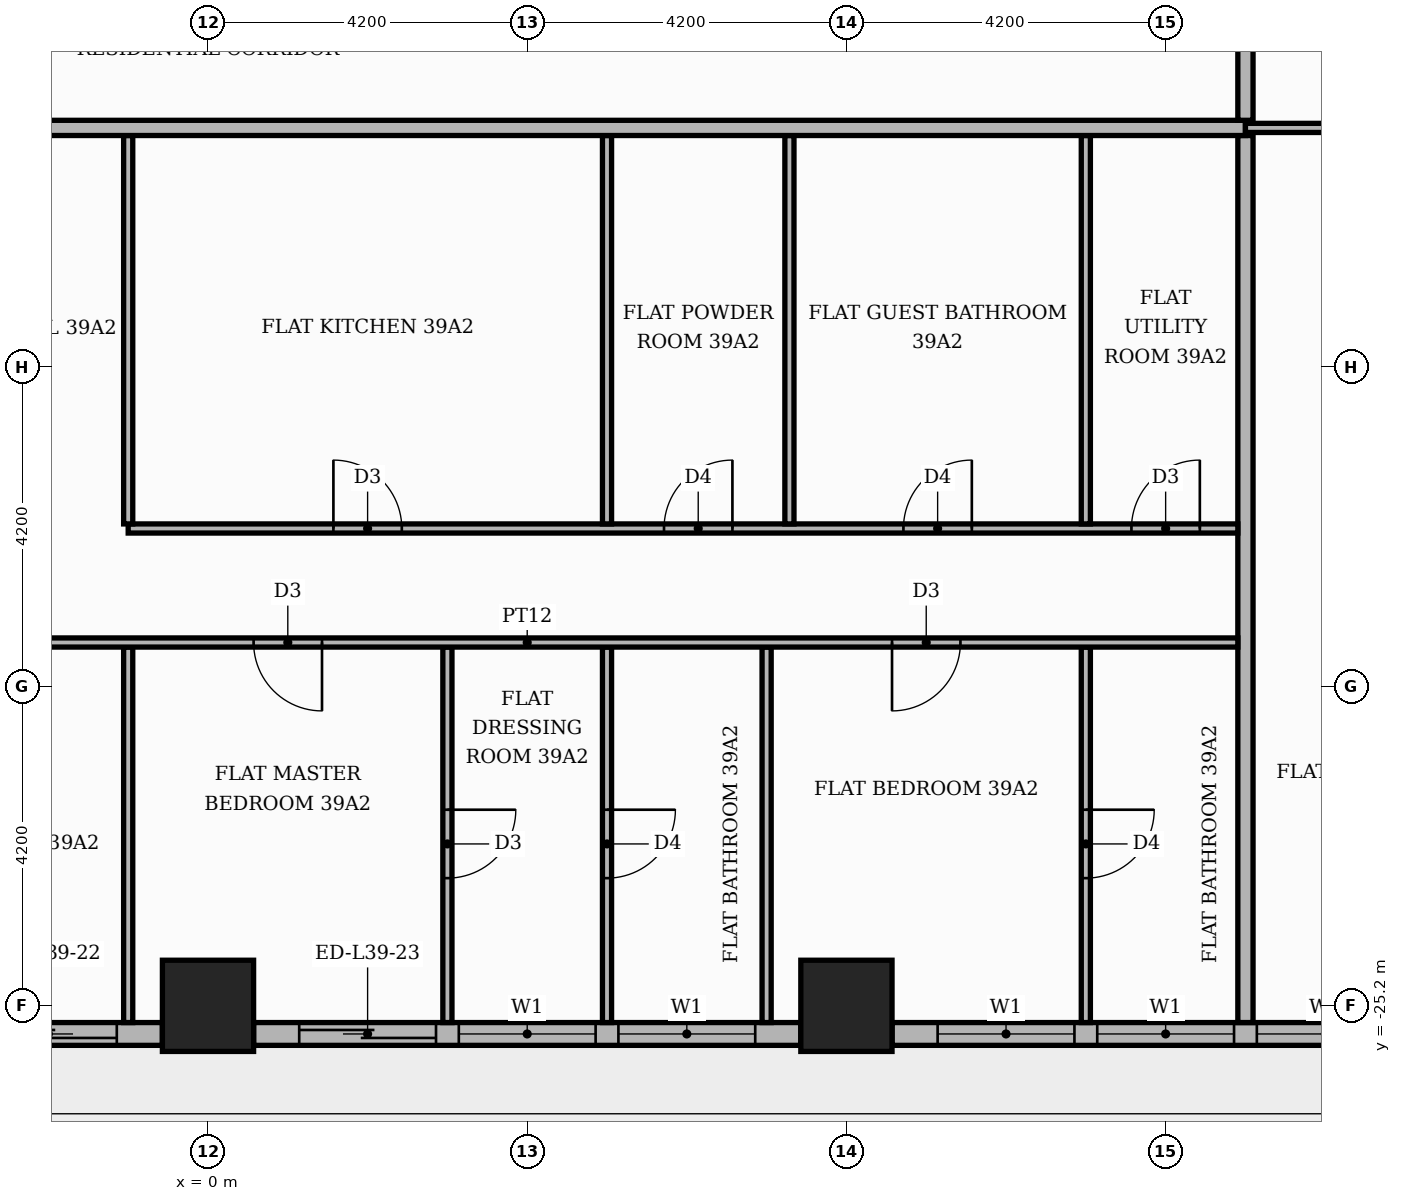
"""IFC4 building model, lengths in metres.
Left out: names, types, materials, properties, quantities, classifications, styles, units other than length and angle.
Written with IfcOpenShell. Run it as: python <this file> out.ifc"""

import sys

from ifc_helpers import new_model, si_unit, direction, frame, frame_2d, origin, origin_2d, place, context, subcontext, project, spatial, rectangle, extrude, element, fill, save


model = new_model("IFC4")
c1 = context("Model", 3, precision=1e-05, world=origin(), true_north=direction((0.0, 1.0)))
c2 = subcontext(c1, "Body", "Model", "MODEL_VIEW")
j1 = project(units=[si_unit("LENGTHUNIT", "METRE"), si_unit("PLANEANGLEUNIT", "RADIAN")], contexts=[c1])
p1 = place(None, origin())
s1 = spatial("IfcSite", under=j1, at=p1, CompositionType="ELEMENT")
p2 = place(p1, origin())
s2 = spatial("IfcBuilding", under=s1, at=p2, CompositionType="ELEMENT")
p3 = place(p2, frame((0.0, 0.0, 165.0)))
s3 = spatial("IfcBuildingStorey", under=s2, at=p3, CompositionType="ELEMENT", Elevation=165.0)
for number, where, z_axis, x_axis in (
    (1, (0.0, -25.2, 0.0), (0.0, 0.0, 1.0), (1.0, 0.0, 0.0)),
    (2, (8.4, -25.2, 0.0), (0.0, 0.0, 1.0), (1.0, 0.0, 0.0)),
):
    element("IfcColumn", number, at=place(p3, frame(where, z_axis=z_axis, x_axis=x_axis)), inside=s3, PredefinedType="COLUMN", context=c2, shape_type="SweptSolid", body=[
        extrude(rectangle(XDim=1.2, YDim=1.2, at=origin_2d()), origin(), (0.0, 0.0, 1.0), 3.9),
    ])
p4 = place(p3, frame((-7.8, -25.57, 0.0), z_axis=(0.0, 0.0, 1.0), x_axis=(1.0, 0.0, 0.0)))
e3 = element("IfcWall", 3, at=p4, inside=s3, PredefinedType="STANDARD", context=c2, shape_type="SweptSolid", body=[
    extrude(rectangle(XDim=7.2, YDim=0.3, at=frame_2d((3.6, 0.0))), origin(), (0.0, 0.0, 1.0), 3.48),
])
p5 = place(p4, frame((0.6, 0.0, 0.9)))
e4 = element("IfcOpeningElement", 4, at=p5, cuts=e3, PredefinedType="OPENING", context=c2, shape_type="SweptSolid", body=[
    extrude(rectangle(XDim=1.8, YDim=2.1, at=frame_2d((0.9, 1.05))), frame((0.0, 0.16, 0.0), z_axis=(0.0, -1.0, 0.0), x_axis=(1.0, 0.0, 0.0)), (0.0, 0.0, 1.0), 0.32),
])
p6 = place(p4, frame((2.7, 0.0, 0.9)))
e5 = element("IfcOpeningElement", 5, at=p6, cuts=e3, PredefinedType="OPENING", context=c2, shape_type="SweptSolid", body=[
    extrude(rectangle(XDim=1.8, YDim=2.1, at=frame_2d((0.9, 1.05))), frame((0.0, 0.16, 0.0), z_axis=(0.0, -1.0, 0.0), x_axis=(1.0, 0.0, 0.0)), (0.0, 0.0, 1.0), 0.32),
])
p7 = place(p4, frame((4.8, 0.0, 0.0)))
e6 = element("IfcOpeningElement", 6, at=p7, cuts=e3, PredefinedType="OPENING", context=c2, shape_type="SweptSolid", body=[
    extrude(rectangle(XDim=1.8, YDim=2.4, at=frame_2d((0.9, 1.2))), frame((0.0, 0.16, 0.0), z_axis=(0.0, -1.0, 0.0), x_axis=(1.0, 0.0, 0.0)), (0.0, 0.0, 1.0), 0.32),
])
p8 = place(p3, frame((0.6, -25.57, 0.0), z_axis=(0.0, 0.0, 1.0), x_axis=(1.0, 0.0, 0.0)))
e7 = element("IfcWall", 7, at=p8, inside=s3, PredefinedType="STANDARD", context=c2, shape_type="SweptSolid", body=[
    extrude(rectangle(XDim=7.2, YDim=0.3, at=frame_2d((3.6, 0.0))), origin(), (0.0, 0.0, 1.0), 3.48),
])
p9 = place(p8, frame((0.6, 0.0, 0.0)))
e8 = element("IfcOpeningElement", 8, at=p9, cuts=e7, PredefinedType="OPENING", context=c2, shape_type="SweptSolid", body=[
    extrude(rectangle(XDim=1.8, YDim=2.4, at=frame_2d((0.9, 1.2))), frame((0.0, 0.16, 0.0), z_axis=(0.0, -1.0, 0.0), x_axis=(1.0, 0.0, 0.0)), (0.0, 0.0, 1.0), 0.32),
])
p10 = place(p8, frame((2.7, 0.0, 0.9)))
e9 = element("IfcOpeningElement", 9, at=p10, cuts=e7, PredefinedType="OPENING", context=c2, shape_type="SweptSolid", body=[
    extrude(rectangle(XDim=1.8, YDim=2.1, at=frame_2d((0.9, 1.05))), frame((0.0, 0.16, 0.0), z_axis=(0.0, -1.0, 0.0), x_axis=(1.0, 0.0, 0.0)), (0.0, 0.0, 1.0), 0.32),
])
p11 = place(p8, frame((4.8, 0.0, 0.9)))
e10 = element("IfcOpeningElement", 10, at=p11, cuts=e7, PredefinedType="OPENING", context=c2, shape_type="SweptSolid", body=[
    extrude(rectangle(XDim=1.8, YDim=2.1, at=frame_2d((0.9, 1.05))), frame((0.0, 0.16, 0.0), z_axis=(0.0, -1.0, 0.0), x_axis=(1.0, 0.0, 0.0)), (0.0, 0.0, 1.0), 0.32),
])
p12 = place(p3, frame((9.0, -25.57, 0.0), z_axis=(0.0, 0.0, 1.0), x_axis=(1.0, 0.0, 0.0)))
e11 = element("IfcWall", 11, at=p12, inside=s3, PredefinedType="STANDARD", context=c2, shape_type="SweptSolid", body=[
    extrude(rectangle(XDim=7.2, YDim=0.3, at=frame_2d((3.6, 0.0))), origin(), (0.0, 0.0, 1.0), 3.48),
])
p13 = place(p12, frame((0.6, 0.0, 0.9)))
e12 = element("IfcOpeningElement", 12, at=p13, cuts=e11, PredefinedType="OPENING", context=c2, shape_type="SweptSolid", body=[
    extrude(rectangle(XDim=1.8, YDim=2.1, at=frame_2d((0.9, 1.05))), frame((0.0, 0.16, 0.0), z_axis=(0.0, -1.0, 0.0), x_axis=(1.0, 0.0, 0.0)), (0.0, 0.0, 1.0), 0.32),
])
p14 = place(p12, frame((2.7, 0.0, 0.9)))
e13 = element("IfcOpeningElement", 13, at=p14, cuts=e11, PredefinedType="OPENING", context=c2, shape_type="SweptSolid", body=[
    extrude(rectangle(XDim=1.8, YDim=2.1, at=frame_2d((0.9, 1.05))), frame((0.0, 0.16, 0.0), z_axis=(0.0, -1.0, 0.0), x_axis=(1.0, 0.0, 0.0)), (0.0, 0.0, 1.0), 0.32),
])
p15 = place(p12, frame((4.8, 0.0, 0.9)))
e14 = element("IfcOpeningElement", 14, at=p15, cuts=e11, PredefinedType="OPENING", context=c2, shape_type="SweptSolid", body=[
    extrude(rectangle(XDim=1.8, YDim=2.1, at=frame_2d((0.9, 1.05))), frame((0.0, 0.16, 0.0), z_axis=(0.0, -1.0, 0.0), x_axis=(1.0, 0.0, 0.0)), (0.0, 0.0, 1.0), 0.32),
])
p16 = place(p3, frame((-1.05, -25.42, 0.0), z_axis=(0.0, 0.0, 1.0), x_axis=(0.0, 1.0, 0.0)))
e15 = element("IfcWall", 15, at=p16, inside=s3, PredefinedType="PARTITIONING", context=c2, shape_type="SweptSolid", body=[
    extrude(rectangle(XDim=4.94, YDim=0.12, at=frame_2d((2.47, 0.0))), origin(), (0.0, 0.0, 1.0), 3.48),
])
p17 = place(p3, frame((3.15, -25.42, 0.0), z_axis=(0.0, 0.0, 1.0), x_axis=(0.0, 1.0, 0.0)))
e16 = element("IfcWall", 16, at=p17, inside=s3, PredefinedType="PARTITIONING", context=c2, shape_type="SweptSolid", body=[
    extrude(rectangle(XDim=4.94, YDim=0.12, at=frame_2d((2.47, 0.0))), origin(), (0.0, 0.0, 1.0), 3.48),
])
p18 = place(p17, frame((1.9, 0.0, 0.0)))
e17 = element("IfcOpeningElement", 17, at=p18, cuts=e16, PredefinedType="OPENING", context=c2, shape_type="SweptSolid", body=[
    extrude(rectangle(XDim=0.9, YDim=2.1, at=frame_2d((0.45, 1.05))), frame((0.0, 0.07, 0.0), z_axis=(0.0, -1.0, 0.0), x_axis=(1.0, 0.0, 0.0)), (0.0, 0.0, 1.0), 0.14),
])
p19 = place(p3, frame((5.25, -25.42, 0.0), z_axis=(0.0, 0.0, 1.0), x_axis=(0.0, 1.0, 0.0)))
e18 = element("IfcWall", 18, at=p19, inside=s3, PredefinedType="PARTITIONING", context=c2, shape_type="SweptSolid", body=[
    extrude(rectangle(XDim=4.94, YDim=0.12, at=frame_2d((2.47, 0.0))), origin(), (0.0, 0.0, 1.0), 3.48),
])
p20 = place(p19, frame((1.9, 0.0, 0.0)))
e19 = element("IfcOpeningElement", 19, at=p20, cuts=e18, PredefinedType="OPENING", context=c2, shape_type="SweptSolid", body=[
    extrude(rectangle(XDim=0.9, YDim=2.1, at=frame_2d((0.45, 1.05))), frame((0.0, 0.07, 0.0), z_axis=(0.0, -1.0, 0.0), x_axis=(1.0, 0.0, 0.0)), (0.0, 0.0, 1.0), 0.14),
])
p21 = place(p3, frame((7.35, -25.42, 0.0), z_axis=(0.0, 0.0, 1.0), x_axis=(0.0, 1.0, 0.0)))
e20 = element("IfcWall", 20, at=p21, inside=s3, PredefinedType="PARTITIONING", context=c2, shape_type="SweptSolid", body=[
    extrude(rectangle(XDim=4.94, YDim=0.12, at=frame_2d((2.47, 0.0))), origin(), (0.0, 0.0, 1.0), 3.48),
])
p22 = place(p3, frame((11.55, -25.42, 0.0), z_axis=(0.0, 0.0, 1.0), x_axis=(0.0, 1.0, 0.0)))
e21 = element("IfcWall", 21, at=p22, inside=s3, PredefinedType="PARTITIONING", context=c2, shape_type="SweptSolid", body=[
    extrude(rectangle(XDim=4.94, YDim=0.12, at=frame_2d((2.47, 0.0))), origin(), (0.0, 0.0, 1.0), 3.48),
])
p23 = place(p22, frame((1.9, 0.0, 0.0)))
e22 = element("IfcOpeningElement", 22, at=p23, cuts=e21, PredefinedType="OPENING", context=c2, shape_type="SweptSolid", body=[
    extrude(rectangle(XDim=0.9, YDim=2.1, at=frame_2d((0.45, 1.05))), frame((0.0, 0.07, 0.0), z_axis=(0.0, -1.0, 0.0), x_axis=(1.0, 0.0, 0.0)), (0.0, 0.0, 1.0), 0.14),
])
p24 = place(p3, frame((13.65, -25.42, 0.0), z_axis=(0.0, 0.0, 1.0), x_axis=(0.0, 1.0, 0.0)))
e23 = element("IfcWall", 23, at=p24, inside=s3, PredefinedType="PARTITIONING", context=c2, shape_type="SweptSolid", body=[
    extrude(rectangle(XDim=11.67, YDim=0.2, at=frame_2d((5.835, 0.0))), origin(), (0.0, 0.0, 1.0), 3.48),
])
p25 = place(p3, frame((-5.15, -20.42, 0.0), z_axis=(0.0, 0.0, 1.0), x_axis=(1.0, 0.0, 0.0)))
e24 = element("IfcWall", 24, at=p25, inside=s3, PredefinedType="PARTITIONING", context=c2, shape_type="SweptSolid", body=[
    extrude(rectangle(XDim=18.7, YDim=0.12, at=frame_2d((9.35, 0.0))), origin(), (0.0, 0.0, 1.0), 3.48),
])
p26 = place(p25, frame((1.5, 0.0, 0.0)))
e25 = element("IfcOpeningElement", 25, at=p26, cuts=e24, PredefinedType="OPENING", context=c2, shape_type="SweptSolid", body=[
    extrude(rectangle(XDim=1.0, YDim=2.1, at=frame_2d((0.5, 1.05))), frame((0.0, 0.07, 0.0), z_axis=(0.0, -1.0, 0.0), x_axis=(1.0, 0.0, 0.0)), (0.0, 0.0, 1.0), 0.14),
])
p27 = place(p25, frame((5.75, 0.0, 0.0)))
e26 = element("IfcOpeningElement", 26, at=p27, cuts=e24, PredefinedType="OPENING", context=c2, shape_type="SweptSolid", body=[
    extrude(rectangle(XDim=0.9, YDim=2.1, at=frame_2d((0.45, 1.05))), frame((0.0, 0.07, 0.0), z_axis=(0.0, -1.0, 0.0), x_axis=(1.0, 0.0, 0.0)), (0.0, 0.0, 1.0), 0.14),
])
p28 = place(p25, frame((14.15, 0.0, 0.0)))
e27 = element("IfcOpeningElement", 27, at=p28, cuts=e24, PredefinedType="OPENING", context=c2, shape_type="SweptSolid", body=[
    extrude(rectangle(XDim=0.9, YDim=2.1, at=frame_2d((0.45, 1.05))), frame((0.0, 0.07, 0.0), z_axis=(0.0, -1.0, 0.0), x_axis=(1.0, 0.0, 0.0)), (0.0, 0.0, 1.0), 0.14),
])
p29 = place(p3, frame((-1.05, -18.92, 0.0), z_axis=(0.0, 0.0, 1.0), x_axis=(1.0, 0.0, 0.0)))
e28 = element("IfcWall", 28, at=p29, inside=s3, PredefinedType="PARTITIONING", context=c2, shape_type="SweptSolid", body=[
    extrude(rectangle(XDim=14.6, YDim=0.12, at=frame_2d((7.3, 0.0))), origin(), (0.0, 0.0, 1.0), 3.48),
])
p30 = place(p29, frame((2.7, 0.0, 0.0)))
e29 = element("IfcOpeningElement", 29, at=p30, cuts=e28, PredefinedType="OPENING", context=c2, shape_type="SweptSolid", body=[
    extrude(rectangle(XDim=0.9, YDim=2.1, at=frame_2d((0.45, 1.05))), frame((0.0, 0.07, 0.0), z_axis=(0.0, -1.0, 0.0), x_axis=(1.0, 0.0, 0.0)), (0.0, 0.0, 1.0), 0.14),
])
p31 = place(p29, frame((7.05, 0.0, 0.0)))
e30 = element("IfcOpeningElement", 30, at=p31, cuts=e28, PredefinedType="OPENING", context=c2, shape_type="SweptSolid", body=[
    extrude(rectangle(XDim=0.9, YDim=2.1, at=frame_2d((0.45, 1.05))), frame((0.0, 0.07, 0.0), z_axis=(0.0, -1.0, 0.0), x_axis=(1.0, 0.0, 0.0)), (0.0, 0.0, 1.0), 0.14),
])
p32 = place(p29, frame((10.2, 0.0, 0.0)))
e31 = element("IfcOpeningElement", 31, at=p32, cuts=e28, PredefinedType="OPENING", context=c2, shape_type="SweptSolid", body=[
    extrude(rectangle(XDim=0.9, YDim=2.1, at=frame_2d((0.45, 1.05))), frame((0.0, 0.07, 0.0), z_axis=(0.0, -1.0, 0.0), x_axis=(1.0, 0.0, 0.0)), (0.0, 0.0, 1.0), 0.14),
])
p33 = place(p29, frame((13.2, 0.0, 0.0)))
e32 = element("IfcOpeningElement", 32, at=p33, cuts=e28, PredefinedType="OPENING", context=c2, shape_type="SweptSolid", body=[
    extrude(rectangle(XDim=0.9, YDim=2.1, at=frame_2d((0.45, 1.05))), frame((0.0, 0.07, 0.0), z_axis=(0.0, -1.0, 0.0), x_axis=(1.0, 0.0, 0.0)), (0.0, 0.0, 1.0), 0.14),
])
for number, where, z_axis, x_axis in (
    (33, (-1.05, -18.86, 0.0), (0.0, 0.0, 1.0), (0.0, 1.0, 0.0)),
    (34, (5.25, -18.86, 0.0), (0.0, 0.0, 1.0), (0.0, 1.0, 0.0)),
    (35, (7.65, -18.86, 0.0), (0.0, 0.0, 1.0), (0.0, 1.0, 0.0)),
    (36, (11.55, -18.86, 0.0), (0.0, 0.0, 1.0), (0.0, 1.0, 0.0)),
):
    element("IfcWall", number, at=place(p3, frame(where, z_axis=z_axis, x_axis=x_axis)), inside=s3, PredefinedType="PARTITIONING", context=c2, shape_type="SweptSolid", body=[
        extrude(rectangle(XDim=5.11, YDim=0.12, at=frame_2d((2.555, 0.0))), origin(), (0.0, 0.0, 1.0), 3.48),
    ])
p34 = place(p3, frame((-25.42, -13.65, 0.0), z_axis=(0.0, 0.0, 1.0), x_axis=(1.0, 0.0, 0.0)))
e37 = element("IfcWall", 37, at=p34, inside=s3, PredefinedType="PARTITIONING", context=c2, shape_type="SweptSolid", body=[
    extrude(rectangle(XDim=39.07, YDim=0.2, at=frame_2d((19.535, 0.0))), origin(), (0.0, 0.0, 1.0), 3.48),
])
p35 = place(p34, frame((13.32, 0.0, 0.0)))
e38 = element("IfcOpeningElement", 38, at=p35, cuts=e37, PredefinedType="OPENING", context=c2, shape_type="SweptSolid", body=[
    extrude(rectangle(XDim=1.1, YDim=2.4, at=frame_2d((0.55, 1.2))), frame((0.0, 0.11, 0.0), z_axis=(0.0, -1.0, 0.0), x_axis=(1.0, 0.0, 0.0)), (0.0, 0.0, 1.0), 0.22),
])
p36 = place(p34, frame((21.72, 0.0, 0.0)))
e39 = element("IfcOpeningElement", 39, at=p36, cuts=e37, PredefinedType="OPENING", context=c2, shape_type="SweptSolid", body=[
    extrude(rectangle(XDim=1.1, YDim=2.4, at=frame_2d((0.55, 1.2))), frame((0.0, 0.11, 0.0), z_axis=(0.0, -1.0, 0.0), x_axis=(1.0, 0.0, 0.0)), (0.0, 0.0, 1.0), 0.22),
])
p37 = place(p3, frame((13.65, -13.65, 0.0), z_axis=(0.0, 0.0, 1.0), x_axis=(1.0, 0.0, 0.0)))
e40 = element("IfcWall", 40, at=p37, inside=s3, PredefinedType="PARTITIONING", context=c2, shape_type="SweptSolid", body=[
    extrude(rectangle(XDim=7.07, YDim=0.12, at=frame_2d((3.535, 0.0))), origin(), (0.0, 0.0, 1.0), 3.48),
])
p38 = place(p37, frame((3.085, 0.0, 0.0)))
e41 = element("IfcOpeningElement", 41, at=p38, cuts=e40, PredefinedType="OPENING", context=c2, shape_type="SweptSolid", body=[
    extrude(rectangle(XDim=0.9, YDim=2.1, at=frame_2d((0.45, 1.05))), frame((0.0, 0.07, 0.0), z_axis=(0.0, -1.0, 0.0), x_axis=(1.0, 0.0, 0.0)), (0.0, 0.0, 1.0), 0.14),
])
p39 = place(p3, frame((13.65, -13.55, 0.0), z_axis=(0.0, 0.0, 1.0), x_axis=(0.0, 1.0, 0.0)))
e42 = element("IfcWall", 42, at=p39, inside=s3, PredefinedType="PARTITIONING", context=c2, shape_type="SweptSolid", body=[
    extrude(rectangle(XDim=2.45, YDim=0.2, at=frame_2d((1.225, 0.0))), origin(), (0.0, 0.0, 1.0), 3.48),
])
p40 = place(p7, origin())
e43 = element("IfcDoor", 43, at=p40, inside=s3, OperationType="SLIDING_TO_RIGHT", PredefinedType="DOOR", context=c2, shape_type="SweptSolid", body=[
    extrude(rectangle(XDim=1.8, YDim=2.4, at=frame_2d((0.9, 1.2))), frame((0.0, 0.025, 0.0), z_axis=(0.0, -1.0, 0.0), x_axis=(1.0, 0.0, 0.0)), (0.0, 0.0, 1.0), 0.05),
])
fill(e6, e43)
p41 = place(p9, origin())
e44 = element("IfcDoor", 44, at=p41, inside=s3, OperationType="SLIDING_TO_LEFT", PredefinedType="DOOR", context=c2, shape_type="SweptSolid", body=[
    extrude(rectangle(XDim=1.8, YDim=2.4, at=frame_2d((0.9, 1.2))), frame((0.0, 0.025, 0.0), z_axis=(0.0, -1.0, 0.0), x_axis=(1.0, 0.0, 0.0)), (0.0, 0.0, 1.0), 0.05),
])
fill(e8, e44)
p42 = place(p10, origin())
e45 = element("IfcWindow", 45, at=p42, inside=s3, PartitioningType="SINGLE_PANEL", PredefinedType="WINDOW", context=c2, shape_type="SweptSolid", body=[
    extrude(rectangle(XDim=1.8, YDim=2.1, at=frame_2d((0.9, 1.05))), frame((0.0, 0.03, 0.0), z_axis=(0.0, -1.0, 0.0), x_axis=(1.0, 0.0, 0.0)), (0.0, 0.0, 1.0), 0.06),
])
fill(e9, e45)
p43 = place(p11, origin())
e46 = element("IfcWindow", 46, at=p43, inside=s3, PartitioningType="SINGLE_PANEL", PredefinedType="WINDOW", context=c2, shape_type="SweptSolid", body=[
    extrude(rectangle(XDim=1.8, YDim=2.1, at=frame_2d((0.9, 1.05))), frame((0.0, 0.03, 0.0), z_axis=(0.0, -1.0, 0.0), x_axis=(1.0, 0.0, 0.0)), (0.0, 0.0, 1.0), 0.06),
])
fill(e10, e46)
p44 = place(p13, origin())
e47 = element("IfcWindow", 47, at=p44, inside=s3, PartitioningType="SINGLE_PANEL", PredefinedType="WINDOW", context=c2, shape_type="SweptSolid", body=[
    extrude(rectangle(XDim=1.8, YDim=2.1, at=frame_2d((0.9, 1.05))), frame((0.0, 0.03, 0.0), z_axis=(0.0, -1.0, 0.0), x_axis=(1.0, 0.0, 0.0)), (0.0, 0.0, 1.0), 0.06),
])
fill(e12, e47)
p45 = place(p14, origin())
e48 = element("IfcWindow", 48, at=p45, inside=s3, PartitioningType="SINGLE_PANEL", PredefinedType="WINDOW", context=c2, shape_type="SweptSolid", body=[
    extrude(rectangle(XDim=1.8, YDim=2.1, at=frame_2d((0.9, 1.05))), frame((0.0, 0.03, 0.0), z_axis=(0.0, -1.0, 0.0), x_axis=(1.0, 0.0, 0.0)), (0.0, 0.0, 1.0), 0.06),
])
fill(e13, e48)
p46 = place(p15, origin())
e49 = element("IfcWindow", 49, at=p46, inside=s3, PartitioningType="SINGLE_PANEL", PredefinedType="WINDOW", context=c2, shape_type="SweptSolid", body=[
    extrude(rectangle(XDim=1.8, YDim=2.1, at=frame_2d((0.9, 1.05))), frame((0.0, 0.03, 0.0), z_axis=(0.0, -1.0, 0.0), x_axis=(1.0, 0.0, 0.0)), (0.0, 0.0, 1.0), 0.06),
])
fill(e14, e49)
p47 = place(p30, origin())
e50 = element("IfcDoor", 50, at=p47, inside=s3, OperationType="SINGLE_SWING_LEFT", PredefinedType="DOOR", context=c2, shape_type="SweptSolid", body=[
    extrude(rectangle(XDim=0.9, YDim=2.1, at=frame_2d((0.45, 1.05))), frame((0.0, 0.025, 0.0), z_axis=(0.0, -1.0, 0.0), x_axis=(1.0, 0.0, 0.0)), (0.0, 0.0, 1.0), 0.05),
])
fill(e29, e50)
p48 = place(p31, origin())
e51 = element("IfcDoor", 51, at=p48, inside=s3, OperationType="SINGLE_SWING_RIGHT", PredefinedType="DOOR", context=c2, shape_type="SweptSolid", body=[
    extrude(rectangle(XDim=0.9, YDim=2.1, at=frame_2d((0.45, 1.05))), frame((0.0, 0.025, 0.0), z_axis=(0.0, -1.0, 0.0), x_axis=(1.0, 0.0, 0.0)), (0.0, 0.0, 1.0), 0.05),
])
fill(e30, e51)
p49 = place(p32, origin())
e52 = element("IfcDoor", 52, at=p49, inside=s3, OperationType="SINGLE_SWING_RIGHT", PredefinedType="DOOR", context=c2, shape_type="SweptSolid", body=[
    extrude(rectangle(XDim=0.9, YDim=2.1, at=frame_2d((0.45, 1.05))), frame((0.0, 0.025, 0.0), z_axis=(0.0, -1.0, 0.0), x_axis=(1.0, 0.0, 0.0)), (0.0, 0.0, 1.0), 0.05),
])
fill(e31, e52)
p50 = place(p33, origin())
e53 = element("IfcDoor", 53, at=p50, inside=s3, OperationType="SINGLE_SWING_RIGHT", PredefinedType="DOOR", context=c2, shape_type="SweptSolid", body=[
    extrude(rectangle(XDim=0.9, YDim=2.1, at=frame_2d((0.45, 1.05))), frame((0.0, 0.025, 0.0), z_axis=(0.0, -1.0, 0.0), x_axis=(1.0, 0.0, 0.0)), (0.0, 0.0, 1.0), 0.05),
])
fill(e32, e53)
p51 = place(p27, frame((0.9, 0.0, 0.0), z_axis=(0.0, 0.0, 1.0), x_axis=(-1.0, 0.0, 0.0)))
e54 = element("IfcDoor", 54, at=p51, inside=s3, OperationType="SINGLE_SWING_RIGHT", PredefinedType="DOOR", context=c2, shape_type="SweptSolid", body=[
    extrude(rectangle(XDim=0.9, YDim=2.1, at=frame_2d((0.45, 1.05))), frame((0.0, 0.025, 0.0), z_axis=(0.0, -1.0, 0.0), x_axis=(1.0, 0.0, 0.0)), (0.0, 0.0, 1.0), 0.05),
])
fill(e26, e54)
p52 = place(p18, frame((0.9, 0.0, 0.0), z_axis=(0.0, 0.0, 1.0), x_axis=(-1.0, 0.0, 0.0)))
e55 = element("IfcDoor", 55, at=p52, inside=s3, OperationType="SINGLE_SWING_RIGHT", PredefinedType="DOOR", context=c2, shape_type="SweptSolid", body=[
    extrude(rectangle(XDim=0.9, YDim=2.1, at=frame_2d((0.45, 1.05))), frame((0.0, 0.025, 0.0), z_axis=(0.0, -1.0, 0.0), x_axis=(1.0, 0.0, 0.0)), (0.0, 0.0, 1.0), 0.05),
])
fill(e17, e55)
p53 = place(p20, frame((0.9, 0.0, 0.0), z_axis=(0.0, 0.0, 1.0), x_axis=(-1.0, 0.0, 0.0)))
e56 = element("IfcDoor", 56, at=p53, inside=s3, OperationType="SINGLE_SWING_RIGHT", PredefinedType="DOOR", context=c2, shape_type="SweptSolid", body=[
    extrude(rectangle(XDim=0.9, YDim=2.1, at=frame_2d((0.45, 1.05))), frame((0.0, 0.025, 0.0), z_axis=(0.0, -1.0, 0.0), x_axis=(1.0, 0.0, 0.0)), (0.0, 0.0, 1.0), 0.05),
])
fill(e19, e56)
p54 = place(p28, frame((0.9, 0.0, 0.0), z_axis=(0.0, 0.0, 1.0), x_axis=(-1.0, 0.0, 0.0)))
e57 = element("IfcDoor", 57, at=p54, inside=s3, OperationType="SINGLE_SWING_LEFT", PredefinedType="DOOR", context=c2, shape_type="SweptSolid", body=[
    extrude(rectangle(XDim=0.9, YDim=2.1, at=frame_2d((0.45, 1.05))), frame((0.0, 0.025, 0.0), z_axis=(0.0, -1.0, 0.0), x_axis=(1.0, 0.0, 0.0)), (0.0, 0.0, 1.0), 0.05),
])
fill(e27, e57)
p55 = place(p23, frame((0.9, 0.0, 0.0), z_axis=(0.0, 0.0, 1.0), x_axis=(-1.0, 0.0, 0.0)))
e58 = element("IfcDoor", 58, at=p55, inside=s3, OperationType="SINGLE_SWING_RIGHT", PredefinedType="DOOR", context=c2, shape_type="SweptSolid", body=[
    extrude(rectangle(XDim=0.9, YDim=2.1, at=frame_2d((0.45, 1.05))), frame((0.0, 0.025, 0.0), z_axis=(0.0, -1.0, 0.0), x_axis=(1.0, 0.0, 0.0)), (0.0, 0.0, 1.0), 0.05),
])
fill(e22, e58)
save(model, sys.argv[1])
